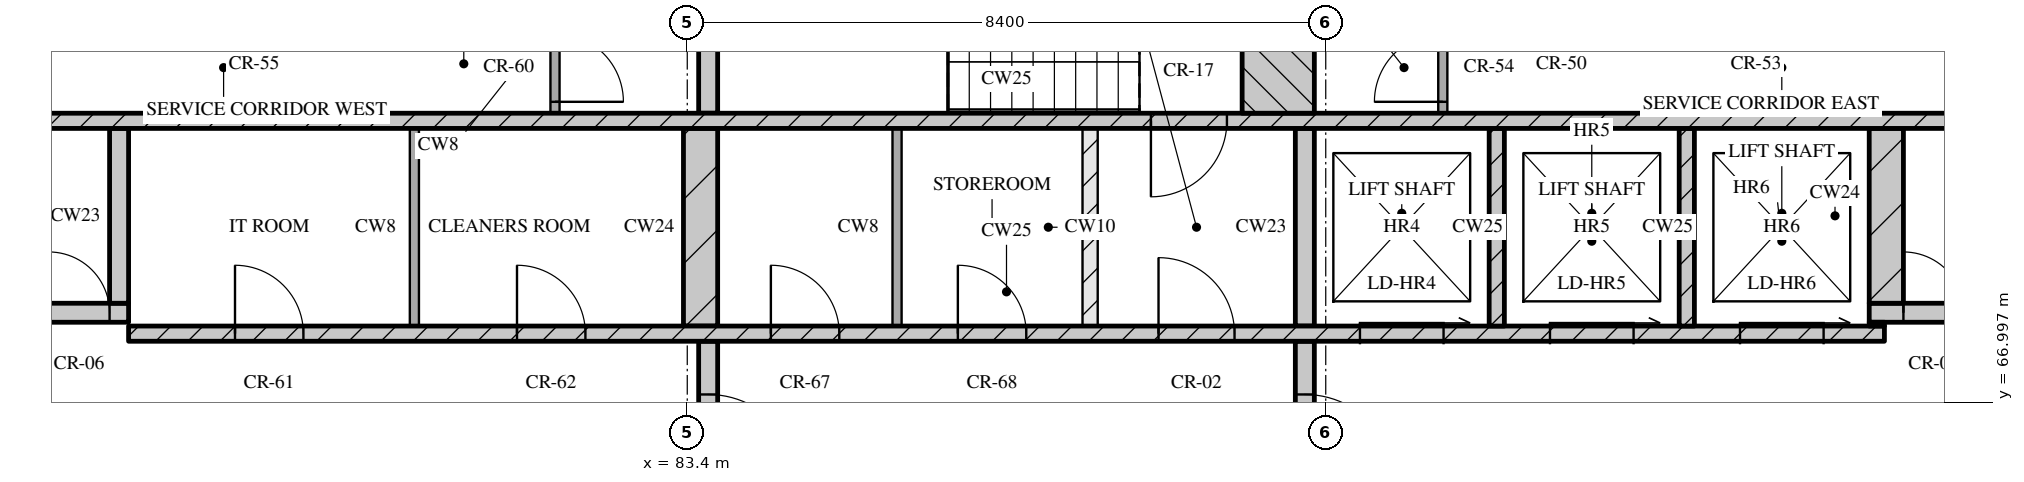
"""IFC4 building model, lengths in metres.
Left out: names, types, materials, properties, quantities, classifications, styles, units other than length and angle.
Written with IfcOpenShell. Run it as: python <this file> out.ifc"""

import sys

from ifc_helpers import new_model, si_unit, direction, frame, frame_2d, origin, place, context, subcontext, project, spatial, rectangle, extrude, element, fill, save


model = new_model("IFC4")
c1 = context("Model", 3, precision=1e-05, world=origin(), true_north=direction((0.0, 1.0)))
c2 = subcontext(c1, "Body", "Model", "MODEL_VIEW")
j1 = project(units=[si_unit("LENGTHUNIT", "METRE"), si_unit("PLANEANGLEUNIT", "RADIAN")], contexts=[c1])
p1 = place(None, origin())
s1 = spatial("IfcSite", under=j1, at=p1, CompositionType="ELEMENT")
p2 = place(p1, origin())
s2 = spatial("IfcBuilding", under=s1, at=p2, CompositionType="ELEMENT")
p3 = place(p2, frame((0.0, 0.0, 303.15)))
s3 = spatial("IfcBuildingStorey", under=s2, at=p3, CompositionType="ELEMENT", Elevation=303.15)
p4 = place(p3, frame((83.675, 65.2, 0.0), z_axis=(0.0, 0.0, 1.0), x_axis=(0.0, 1.0, 0.0)))
e1 = element("IfcWall", 1, at=p4, inside=s3, PredefinedType="SOLIDWALL", context=c2, shape_type="SweptSolid", body=[
    extrude(rectangle(XDim=2.6, YDim=0.25, at=frame_2d((1.3, 0.0))), origin(), (0.0, 0.0, 1.0), 3.32),
])
p5 = place(p4, frame((0.7, 0.0, 0.0)))
e2 = element("IfcOpeningElement", 2, at=p5, cuts=e1, PredefinedType="OPENING", context=c2, shape_type="SweptSolid", body=[
    extrude(rectangle(XDim=1.2, YDim=2.1, at=frame_2d((0.6, 1.05))), frame((0.0, 0.135, 0.0), z_axis=(0.0, -1.0, 0.0), x_axis=(1.0, 0.0, 0.0)), (0.0, 0.0, 1.0), 0.27),
])
p6 = place(p3, frame((91.525, 65.2, 0.0), z_axis=(0.0, 0.0, 1.0), x_axis=(0.0, 1.0, 0.0)))
e3 = element("IfcWall", 3, at=p6, inside=s3, PredefinedType="SOLIDWALL", context=c2, shape_type="SweptSolid", body=[
    extrude(rectangle(XDim=2.6, YDim=0.25, at=frame_2d((1.3, 0.0))), origin(), (0.0, 0.0, 1.0), 3.32),
])
p7 = place(p6, frame((0.7, 0.0, 0.0)))
e4 = element("IfcOpeningElement", 4, at=p7, cuts=e3, PredefinedType="OPENING", context=c2, shape_type="SweptSolid", body=[
    extrude(rectangle(XDim=1.2, YDim=2.1, at=frame_2d((0.6, 1.05))), frame((0.0, 0.135, 0.0), z_axis=(0.0, -1.0, 0.0), x_axis=(1.0, 0.0, 0.0)), (0.0, 0.0, 1.0), 0.27),
])
p8 = place(p3, frame((76.05, 67.9, 0.0), z_axis=(0.0, 0.0, 1.0), x_axis=(1.0, 0.0, 0.0)))
e5 = element("IfcWall", 5, at=p8, inside=s3, PredefinedType="SOLIDWALL", context=c2, shape_type="SweptSolid", body=[
    extrude(rectangle(XDim=23.1, YDim=0.2, at=frame_2d((11.55, 0.0))), origin(), (0.0, 0.0, 1.0), 3.32),
])
p9 = place(p8, frame((1.4, 0.0, 0.0)))
e6 = element("IfcOpeningElement", 6, at=p9, cuts=e5, PredefinedType="OPENING", context=c2, shape_type="SweptSolid", body=[
    extrude(rectangle(XDim=0.9, YDim=2.1, at=frame_2d((0.45, 1.05))), frame((0.0, 0.11, 0.0), z_axis=(0.0, -1.0, 0.0), x_axis=(1.0, 0.0, 0.0)), (0.0, 0.0, 1.0), 0.22),
])
p10 = place(p8, frame((5.11, 0.0, 0.0)))
e7 = element("IfcOpeningElement", 7, at=p10, cuts=e5, PredefinedType="OPENING", context=c2, shape_type="SweptSolid", body=[
    extrude(rectangle(XDim=0.9, YDim=2.1, at=frame_2d((0.45, 1.05))), frame((0.0, 0.11, 0.0), z_axis=(0.0, -1.0, 0.0), x_axis=(1.0, 0.0, 0.0)), (0.0, 0.0, 1.0), 0.22),
])
p11 = place(p8, frame((8.45, 0.0, 0.0)))
e8 = element("IfcOpeningElement", 8, at=p11, cuts=e5, PredefinedType="OPENING", context=c2, shape_type="SweptSolid", body=[
    extrude(rectangle(XDim=0.9, YDim=2.1, at=frame_2d((0.45, 1.05))), frame((0.0, 0.11, 0.0), z_axis=(0.0, -1.0, 0.0), x_axis=(1.0, 0.0, 0.0)), (0.0, 0.0, 1.0), 0.22),
])
p12 = place(p8, frame((10.91, 0.0, 0.0)))
e9 = element("IfcOpeningElement", 9, at=p12, cuts=e5, PredefinedType="OPENING", context=c2, shape_type="SweptSolid", body=[
    extrude(rectangle(XDim=0.9, YDim=2.1, at=frame_2d((0.45, 1.05))), frame((0.0, 0.11, 0.0), z_axis=(0.0, -1.0, 0.0), x_axis=(1.0, 0.0, 0.0)), (0.0, 0.0, 1.0), 0.22),
])
p13 = place(p8, frame((13.55, 0.0, 0.0)))
e10 = element("IfcOpeningElement", 10, at=p13, cuts=e5, PredefinedType="OPENING", context=c2, shape_type="SweptSolid", body=[
    extrude(rectangle(XDim=1.0, YDim=2.1, at=frame_2d((0.5, 1.05))), frame((0.0, 0.11, 0.0), z_axis=(0.0, -1.0, 0.0), x_axis=(1.0, 0.0, 0.0)), (0.0, 0.0, 1.0), 0.22),
])
p14 = place(p8, frame((16.2, 0.0, 0.0)))
e11 = element("IfcOpeningElement", 11, at=p14, cuts=e5, PredefinedType="OPENING", context=c2, shape_type="SweptSolid", body=[
    extrude(rectangle(XDim=1.1, YDim=2.1, at=frame_2d((0.55, 1.05))), frame((0.0, 0.11, 0.0), z_axis=(0.0, -1.0, 0.0), x_axis=(1.0, 0.0, 0.0)), (0.0, 0.0, 1.0), 0.22),
])
p15 = place(p8, frame((18.7, 0.0, 0.0)))
e12 = element("IfcOpeningElement", 12, at=p15, cuts=e5, PredefinedType="OPENING", context=c2, shape_type="SweptSolid", body=[
    extrude(rectangle(XDim=1.1, YDim=2.1, at=frame_2d((0.55, 1.05))), frame((0.0, 0.11, 0.0), z_axis=(0.0, -1.0, 0.0), x_axis=(1.0, 0.0, 0.0)), (0.0, 0.0, 1.0), 0.22),
])
p16 = place(p8, frame((21.2, 0.0, 0.0)))
e13 = element("IfcOpeningElement", 13, at=p16, cuts=e5, PredefinedType="OPENING", context=c2, shape_type="SweptSolid", body=[
    extrude(rectangle(XDim=1.1, YDim=2.1, at=frame_2d((0.55, 1.05))), frame((0.0, 0.11, 0.0), z_axis=(0.0, -1.0, 0.0), x_axis=(1.0, 0.0, 0.0)), (0.0, 0.0, 1.0), 0.22),
])
p17 = place(p3, frame((79.81, 68.0, 0.0), z_axis=(0.0, 0.0, 1.0), x_axis=(0.0, 1.0, 0.0)))
e14 = element("IfcWall", 14, at=p17, inside=s3, PredefinedType="PARTITIONING", context=c2, shape_type="SweptSolid", body=[
    extrude(rectangle(XDim=2.6, YDim=0.12, at=frame_2d((1.3, 0.0))), origin(), (0.0, 0.0, 1.0), 3.32),
])
p18 = place(p3, frame((83.575, 68.0, 0.0), z_axis=(0.0, 0.0, 1.0), x_axis=(0.0, 1.0, 0.0)))
e15 = element("IfcWall", 15, at=p18, inside=s3, PredefinedType="SOLIDWALL", context=c2, shape_type="SweptSolid", body=[
    extrude(rectangle(XDim=2.6, YDim=0.45, at=frame_2d((1.3, 0.0))), origin(), (0.0, 0.0, 1.0), 3.32),
])
p19 = place(p3, frame((86.16, 68.0, 0.0), z_axis=(0.0, 0.0, 1.0), x_axis=(0.0, 1.0, 0.0)))
e16 = element("IfcWall", 16, at=p19, inside=s3, PredefinedType="PARTITIONING", context=c2, shape_type="SweptSolid", body=[
    extrude(rectangle(XDim=2.6, YDim=0.12, at=frame_2d((1.3, 0.0))), origin(), (0.0, 0.0, 1.0), 3.32),
])
p20 = place(p3, frame((88.7, 68.0, 0.0), z_axis=(0.0, 0.0, 1.0), x_axis=(0.0, 1.0, 0.0)))
e17 = element("IfcWall", 17, at=p20, inside=s3, PredefinedType="PARTITIONING", context=c2, shape_type="SweptSolid", body=[
    extrude(rectangle(XDim=2.6, YDim=0.2, at=frame_2d((1.3, 0.0))), origin(), (0.0, 0.0, 1.0), 3.32),
])
p21 = place(p3, frame((91.525, 68.0, 0.0), z_axis=(0.0, 0.0, 1.0), x_axis=(0.0, 1.0, 0.0)))
e18 = element("IfcWall", 18, at=p21, inside=s3, PredefinedType="SOLIDWALL", context=c2, shape_type="SweptSolid", body=[
    extrude(rectangle(XDim=2.6, YDim=0.25, at=frame_2d((1.3, 0.0))), origin(), (0.0, 0.0, 1.0), 3.32),
])
for number, where, z_axis, x_axis in (
    (19, (94.05, 68.0, 0.0), (0.0, 0.0, 1.0), (0.0, 1.0, 0.0)),
    (20, (96.55, 68.0, 0.0), (0.0, 0.0, 1.0), (0.0, 1.0, 0.0)),
):
    element("IfcWall", number, at=place(p3, frame(where, z_axis=z_axis, x_axis=x_axis)), inside=s3, PredefinedType="SOLIDWALL", context=c2, shape_type="SweptSolid", body=[
        extrude(rectangle(XDim=2.6, YDim=0.2, at=frame_2d((1.3, 0.0))), origin(), (0.0, 0.0, 1.0), 3.32),
    ])
p22 = place(p3, frame((98.95, 68.025, 0.0), z_axis=(0.0, 0.0, 1.0), x_axis=(1.0, 0.0, 0.0)))
e21 = element("IfcWall", 21, at=p22, inside=s3, PredefinedType="SOLIDWALL", context=c2, shape_type="SweptSolid", body=[
    extrude(rectangle(XDim=0.2, YDim=0.05, at=frame_2d((0.1, 0.0))), origin(), (0.0, 0.0, 1.0), 3.32),
])
p23 = place(p3, frame((67.8, 68.175, 0.0), z_axis=(0.0, 0.0, 1.0), x_axis=(1.0, 0.0, 0.0)))
e22 = element("IfcWall", 22, at=p23, inside=s3, PredefinedType="SOLIDWALL", context=c2, shape_type="SweptSolid", body=[
    extrude(rectangle(XDim=8.25, YDim=0.25, at=frame_2d((4.125, 0.0))), origin(), (0.0, 0.0, 1.0), 3.32),
])
p24 = place(p23, frame((5.7, 0.0, 0.0)))
e23 = element("IfcOpeningElement", 23, at=p24, cuts=e22, PredefinedType="OPENING", context=c2, shape_type="SweptSolid", body=[
    extrude(rectangle(XDim=1.0, YDim=2.1, at=frame_2d((0.5, 1.05))), frame((0.0, 0.135, 0.0), z_axis=(0.0, -1.0, 0.0), x_axis=(1.0, 0.0, 0.0)), (0.0, 0.0, 1.0), 0.27),
])
p25 = place(p23, frame((7.2, 0.0, 0.0)))
e24 = element("IfcOpeningElement", 24, at=p25, cuts=e22, PredefinedType="OPENING", context=c2, shape_type="SweptSolid", body=[
    extrude(rectangle(XDim=0.8, YDim=2.1, at=frame_2d((0.4, 1.05))), frame((0.0, 0.135, 0.0), z_axis=(0.0, -1.0, 0.0), x_axis=(1.0, 0.0, 0.0)), (0.0, 0.0, 1.0), 0.27),
])
p26 = place(p3, frame((98.95, 68.175, 0.0), z_axis=(0.0, 0.0, 1.0), x_axis=(1.0, 0.0, 0.0)))
e25 = element("IfcWall", 25, at=p26, inside=s3, PredefinedType="SOLIDWALL", context=c2, shape_type="SweptSolid", body=[
    extrude(rectangle(XDim=8.45, YDim=0.25, at=frame_2d((4.225, 0.0))), origin(), (0.0, 0.0, 1.0), 3.32),
])
p27 = place(p26, frame((0.45, 0.0, 0.0)))
e26 = element("IfcOpeningElement", 26, at=p27, cuts=e25, PredefinedType="OPENING", context=c2, shape_type="SweptSolid", body=[
    extrude(rectangle(XDim=0.8, YDim=2.1, at=frame_2d((0.4, 1.05))), frame((0.0, 0.135, 0.0), z_axis=(0.0, -1.0, 0.0), x_axis=(1.0, 0.0, 0.0)), (0.0, 0.0, 1.0), 0.27),
])
p28 = place(p26, frame((1.75, 0.0, 0.0)))
e27 = element("IfcOpeningElement", 27, at=p28, cuts=e25, PredefinedType="OPENING", context=c2, shape_type="SweptSolid", body=[
    extrude(rectangle(XDim=1.0, YDim=2.1, at=frame_2d((0.5, 1.05))), frame((0.0, 0.135, 0.0), z_axis=(0.0, -1.0, 0.0), x_axis=(1.0, 0.0, 0.0)), (0.0, 0.0, 1.0), 0.27),
])
p29 = place(p3, frame((75.925, 68.3, 0.0), z_axis=(0.0, 0.0, 1.0), x_axis=(0.0, 1.0, 0.0)))
e28 = element("IfcWall", 28, at=p29, inside=s3, PredefinedType="SOLIDWALL", context=c2, shape_type="SweptSolid", body=[
    extrude(rectangle(XDim=2.3, YDim=0.25, at=frame_2d((1.15, 0.0))), origin(), (0.0, 0.0, 1.0), 3.32),
])
p30 = place(p3, frame((99.175, 68.3, 0.0), z_axis=(0.0, 0.0, 1.0), x_axis=(0.0, 1.0, 0.0)))
e29 = element("IfcWall", 29, at=p30, inside=s3, PredefinedType="SOLIDWALL", context=c2, shape_type="SweptSolid", body=[
    extrude(rectangle(XDim=2.3, YDim=0.45, at=frame_2d((1.15, 0.0))), origin(), (0.0, 0.0, 1.0), 3.32),
])
p31 = place(p3, frame((67.8, 70.7, 0.0), z_axis=(0.0, 0.0, 1.0), x_axis=(1.0, 0.0, 0.0)))
e30 = element("IfcWall", 30, at=p31, inside=s3, PredefinedType="SOLIDWALL", context=c2, shape_type="SweptSolid", body=[
    extrude(rectangle(XDim=39.6, YDim=0.2, at=frame_2d((19.8, 0.0))), origin(), (0.0, 0.0, 1.0), 3.32),
])
p32 = place(p31, frame((0.65, 0.0, 0.0)))
e31 = element("IfcOpeningElement", 31, at=p32, cuts=e30, PredefinedType="OPENING", context=c2, shape_type="SweptSolid", body=[
    extrude(rectangle(XDim=1.1, YDim=2.1, at=frame_2d((0.55, 1.05))), frame((0.0, 0.11, 0.0), z_axis=(0.0, -1.0, 0.0), x_axis=(1.0, 0.0, 0.0)), (0.0, 0.0, 1.0), 0.22),
])
p33 = place(p31, frame((3.25, 0.0, 0.0)))
e32 = element("IfcOpeningElement", 32, at=p33, cuts=e30, PredefinedType="OPENING", context=c2, shape_type="SweptSolid", body=[
    extrude(rectangle(XDim=1.1, YDim=2.1, at=frame_2d((0.55, 1.05))), frame((0.0, 0.11, 0.0), z_axis=(0.0, -1.0, 0.0), x_axis=(1.0, 0.0, 0.0)), (0.0, 0.0, 1.0), 0.22),
])
p34 = place(p31, frame((5.9, 0.0, 0.0)))
e33 = element("IfcOpeningElement", 33, at=p34, cuts=e30, PredefinedType="OPENING", context=c2, shape_type="SweptSolid", body=[
    extrude(rectangle(XDim=1.0, YDim=2.1, at=frame_2d((0.5, 1.05))), frame((0.0, 0.11, 0.0), z_axis=(0.0, -1.0, 0.0), x_axis=(1.0, 0.0, 0.0)), (0.0, 0.0, 1.0), 0.22),
])
p35 = place(p31, frame((21.7, 0.0, 0.0)))
e34 = element("IfcOpeningElement", 34, at=p35, cuts=e30, PredefinedType="OPENING", context=c2, shape_type="SweptSolid", body=[
    extrude(rectangle(XDim=1.0, YDim=2.1, at=frame_2d((0.5, 1.05))), frame((0.0, 0.11, 0.0), z_axis=(0.0, -1.0, 0.0), x_axis=(1.0, 0.0, 0.0)), (0.0, 0.0, 1.0), 0.22),
])
p36 = place(p31, frame((32.7, 0.0, 0.0)))
e35 = element("IfcOpeningElement", 35, at=p36, cuts=e30, PredefinedType="OPENING", context=c2, shape_type="SweptSolid", body=[
    extrude(rectangle(XDim=1.0, YDim=2.1, at=frame_2d((0.5, 1.05))), frame((0.0, 0.11, 0.0), z_axis=(0.0, -1.0, 0.0), x_axis=(1.0, 0.0, 0.0)), (0.0, 0.0, 1.0), 0.22),
])
p37 = place(p31, frame((35.25, 0.0, 0.0)))
e36 = element("IfcOpeningElement", 36, at=p37, cuts=e30, PredefinedType="OPENING", context=c2, shape_type="SweptSolid", body=[
    extrude(rectangle(XDim=1.1, YDim=2.1, at=frame_2d((0.55, 1.05))), frame((0.0, 0.11, 0.0), z_axis=(0.0, -1.0, 0.0), x_axis=(1.0, 0.0, 0.0)), (0.0, 0.0, 1.0), 0.22),
])
p38 = place(p31, frame((37.85, 0.0, 0.0)))
e37 = element("IfcOpeningElement", 37, at=p38, cuts=e30, PredefinedType="OPENING", context=c2, shape_type="SweptSolid", body=[
    extrude(rectangle(XDim=1.1, YDim=2.1, at=frame_2d((0.55, 1.05))), frame((0.0, 0.11, 0.0), z_axis=(0.0, -1.0, 0.0), x_axis=(1.0, 0.0, 0.0)), (0.0, 0.0, 1.0), 0.22),
])
p39 = place(p3, frame((81.66, 70.8, 0.0), z_axis=(0.0, 0.0, 1.0), x_axis=(0.0, 1.0, 0.0)))
e38 = element("IfcWall", 38, at=p39, inside=s3, PredefinedType="PARTITIONING", context=c2, shape_type="SweptSolid", body=[
    extrude(rectangle(XDim=1.2, YDim=0.12, at=frame_2d((0.6, 0.0))), origin(), (0.0, 0.0, 1.0), 3.32),
])
p40 = place(p39, frame((0.15, 0.0, 0.0)))
e39 = element("IfcOpeningElement", 39, at=p40, cuts=e38, PredefinedType="OPENING", context=c2, shape_type="SweptSolid", body=[
    extrude(rectangle(XDim=0.9, YDim=2.1, at=frame_2d((0.45, 1.05))), frame((0.0, 0.07, 0.0), z_axis=(0.0, -1.0, 0.0), x_axis=(1.0, 0.0, 0.0)), (0.0, 0.0, 1.0), 0.14),
])
p41 = place(p3, frame((83.675, 70.8, 0.0), z_axis=(0.0, 0.0, 1.0), x_axis=(0.0, 1.0, 0.0)))
e40 = element("IfcWall", 40, at=p41, inside=s3, PredefinedType="SOLIDWALL", context=c2, shape_type="SweptSolid", body=[
    extrude(rectangle(XDim=2.95, YDim=0.25, at=frame_2d((1.475, 0.0))), origin(), (0.0, 0.0, 1.0), 3.32),
])
p42 = place(p3, frame((91.175, 70.8, 0.0), z_axis=(0.0, 0.0, 1.0), x_axis=(0.0, 1.0, 0.0)))
e41 = element("IfcWall", 41, at=p42, inside=s3, PredefinedType="SOLIDWALL", context=c2, shape_type="SweptSolid", body=[
    extrude(rectangle(XDim=2.95, YDim=0.95, at=frame_2d((1.475, 0.0))), origin(), (0.0, 0.0, 1.0), 3.32),
])
p43 = place(p3, frame((93.34, 70.8, 0.0), z_axis=(0.0, 0.0, 1.0), x_axis=(0.0, 1.0, 0.0)))
e42 = element("IfcWall", 42, at=p43, inside=s3, PredefinedType="PARTITIONING", context=c2, shape_type="SweptSolid", body=[
    extrude(rectangle(XDim=1.2, YDim=0.12, at=frame_2d((0.6, 0.0))), origin(), (0.0, 0.0, 1.0), 3.32),
])
p44 = place(p43, frame((0.15, 0.0, 0.0)))
e43 = element("IfcOpeningElement", 43, at=p44, cuts=e42, PredefinedType="OPENING", context=c2, shape_type="SweptSolid", body=[
    extrude(rectangle(XDim=0.9, YDim=2.1, at=frame_2d((0.45, 1.05))), frame((0.0, 0.07, 0.0), z_axis=(0.0, -1.0, 0.0), x_axis=(1.0, 0.0, 0.0)), (0.0, 0.0, 1.0), 0.14),
])
p45 = place(p5, origin())
e44 = element("IfcDoor", 44, at=p45, inside=s3, OperationType="SINGLE_SWING_RIGHT", PredefinedType="DOOR", context=c2, shape_type="SweptSolid", body=[
    extrude(rectangle(XDim=1.2, YDim=2.1, at=frame_2d((0.6, 1.05))), frame((0.0, 0.025, 0.0), z_axis=(0.0, -1.0, 0.0), x_axis=(1.0, 0.0, 0.0)), (0.0, 0.0, 1.0), 0.05),
])
fill(e2, e44)
p46 = place(p7, origin())
e45 = element("IfcDoor", 45, at=p46, inside=s3, OperationType="SINGLE_SWING_RIGHT", PredefinedType="DOOR", context=c2, shape_type="SweptSolid", body=[
    extrude(rectangle(XDim=1.2, YDim=2.1, at=frame_2d((0.6, 1.05))), frame((0.0, 0.025, 0.0), z_axis=(0.0, -1.0, 0.0), x_axis=(1.0, 0.0, 0.0)), (0.0, 0.0, 1.0), 0.05),
])
fill(e4, e45)
p47 = place(p9, origin())
e46 = element("IfcDoor", 46, at=p47, inside=s3, OperationType="SINGLE_SWING_LEFT", PredefinedType="DOOR", context=c2, shape_type="SweptSolid", body=[
    extrude(rectangle(XDim=0.9, YDim=2.1, at=frame_2d((0.45, 1.05))), frame((0.0, 0.025, 0.0), z_axis=(0.0, -1.0, 0.0), x_axis=(1.0, 0.0, 0.0)), (0.0, 0.0, 1.0), 0.05),
])
fill(e6, e46)
p48 = place(p10, origin())
e47 = element("IfcDoor", 47, at=p48, inside=s3, OperationType="SINGLE_SWING_LEFT", PredefinedType="DOOR", context=c2, shape_type="SweptSolid", body=[
    extrude(rectangle(XDim=0.9, YDim=2.1, at=frame_2d((0.45, 1.05))), frame((0.0, 0.025, 0.0), z_axis=(0.0, -1.0, 0.0), x_axis=(1.0, 0.0, 0.0)), (0.0, 0.0, 1.0), 0.05),
])
fill(e7, e47)
p49 = place(p11, origin())
e48 = element("IfcDoor", 48, at=p49, inside=s3, OperationType="SINGLE_SWING_LEFT", PredefinedType="DOOR", context=c2, shape_type="SweptSolid", body=[
    extrude(rectangle(XDim=0.9, YDim=2.1, at=frame_2d((0.45, 1.05))), frame((0.0, 0.025, 0.0), z_axis=(0.0, -1.0, 0.0), x_axis=(1.0, 0.0, 0.0)), (0.0, 0.0, 1.0), 0.05),
])
fill(e8, e48)
p50 = place(p12, origin())
e49 = element("IfcDoor", 49, at=p50, inside=s3, OperationType="SINGLE_SWING_LEFT", PredefinedType="DOOR", context=c2, shape_type="SweptSolid", body=[
    extrude(rectangle(XDim=0.9, YDim=2.1, at=frame_2d((0.45, 1.05))), frame((0.0, 0.025, 0.0), z_axis=(0.0, -1.0, 0.0), x_axis=(1.0, 0.0, 0.0)), (0.0, 0.0, 1.0), 0.05),
])
fill(e9, e49)
p51 = place(p13, origin())
e50 = element("IfcDoor", 50, at=p51, inside=s3, OperationType="SINGLE_SWING_LEFT", PredefinedType="DOOR", context=c2, shape_type="SweptSolid", body=[
    extrude(rectangle(XDim=1.0, YDim=2.1, at=frame_2d((0.5, 1.05))), frame((0.0, 0.025, 0.0), z_axis=(0.0, -1.0, 0.0), x_axis=(1.0, 0.0, 0.0)), (0.0, 0.0, 1.0), 0.05),
])
fill(e10, e50)
p52 = place(p14, origin())
e51 = element("IfcDoor", 51, at=p52, inside=s3, OperationType="SLIDING_TO_RIGHT", PredefinedType="DOOR", context=c2, shape_type="SweptSolid", body=[
    extrude(rectangle(XDim=1.1, YDim=2.1, at=frame_2d((0.55, 1.05))), frame((0.0, 0.025, 0.0), z_axis=(0.0, -1.0, 0.0), x_axis=(1.0, 0.0, 0.0)), (0.0, 0.0, 1.0), 0.05),
])
fill(e11, e51)
p53 = place(p15, origin())
e52 = element("IfcDoor", 52, at=p53, inside=s3, OperationType="SLIDING_TO_RIGHT", PredefinedType="DOOR", context=c2, shape_type="SweptSolid", body=[
    extrude(rectangle(XDim=1.1, YDim=2.1, at=frame_2d((0.55, 1.05))), frame((0.0, 0.025, 0.0), z_axis=(0.0, -1.0, 0.0), x_axis=(1.0, 0.0, 0.0)), (0.0, 0.0, 1.0), 0.05),
])
fill(e12, e52)
p54 = place(p16, origin())
e53 = element("IfcDoor", 53, at=p54, inside=s3, OperationType="SLIDING_TO_RIGHT", PredefinedType="DOOR", context=c2, shape_type="SweptSolid", body=[
    extrude(rectangle(XDim=1.1, YDim=2.1, at=frame_2d((0.55, 1.05))), frame((0.0, 0.025, 0.0), z_axis=(0.0, -1.0, 0.0), x_axis=(1.0, 0.0, 0.0)), (0.0, 0.0, 1.0), 0.05),
])
fill(e13, e53)
p55 = place(p25, origin())
e54 = element("IfcDoor", 54, at=p55, inside=s3, OperationType="SINGLE_SWING_LEFT", PredefinedType="DOOR", context=c2, shape_type="SweptSolid", body=[
    extrude(rectangle(XDim=0.8, YDim=2.1, at=frame_2d((0.4, 1.05))), frame((0.0, 0.025, 0.0), z_axis=(0.0, -1.0, 0.0), x_axis=(1.0, 0.0, 0.0)), (0.0, 0.0, 1.0), 0.05),
])
fill(e24, e54)
p56 = place(p27, origin())
e55 = element("IfcDoor", 55, at=p56, inside=s3, OperationType="SINGLE_SWING_LEFT", PredefinedType="DOOR", context=c2, shape_type="SweptSolid", body=[
    extrude(rectangle(XDim=0.8, YDim=2.1, at=frame_2d((0.4, 1.05))), frame((0.0, 0.025, 0.0), z_axis=(0.0, -1.0, 0.0), x_axis=(1.0, 0.0, 0.0)), (0.0, 0.0, 1.0), 0.05),
])
fill(e26, e55)
p57 = place(p35, origin())
e56 = element("IfcDoor", 56, at=p57, inside=s3, OperationType="SINGLE_SWING_RIGHT", PredefinedType="DOOR", context=c2, shape_type="SweptSolid", body=[
    extrude(rectangle(XDim=1.0, YDim=2.1, at=frame_2d((0.5, 1.05))), frame((0.0, 0.025, 0.0), z_axis=(0.0, -1.0, 0.0), x_axis=(1.0, 0.0, 0.0)), (0.0, 0.0, 1.0), 0.05),
])
fill(e34, e56)
p58 = place(p40, origin())
e57 = element("IfcDoor", 57, at=p58, inside=s3, OperationType="SINGLE_SWING_RIGHT", PredefinedType="DOOR", context=c2, shape_type="SweptSolid", body=[
    extrude(rectangle(XDim=0.9, YDim=2.1, at=frame_2d((0.45, 1.05))), frame((0.0, 0.025, 0.0), z_axis=(0.0, -1.0, 0.0), x_axis=(1.0, 0.0, 0.0)), (0.0, 0.0, 1.0), 0.05),
])
fill(e39, e57)
p59 = place(p44, origin())
e58 = element("IfcDoor", 58, at=p59, inside=s3, OperationType="SINGLE_SWING_LEFT", PredefinedType="DOOR", context=c2, shape_type="SweptSolid", body=[
    extrude(rectangle(XDim=0.9, YDim=2.1, at=frame_2d((0.45, 1.05))), frame((0.0, 0.025, 0.0), z_axis=(0.0, -1.0, 0.0), x_axis=(1.0, 0.0, 0.0)), (0.0, 0.0, 1.0), 0.05),
])
fill(e43, e58)
save(model, sys.argv[1])
